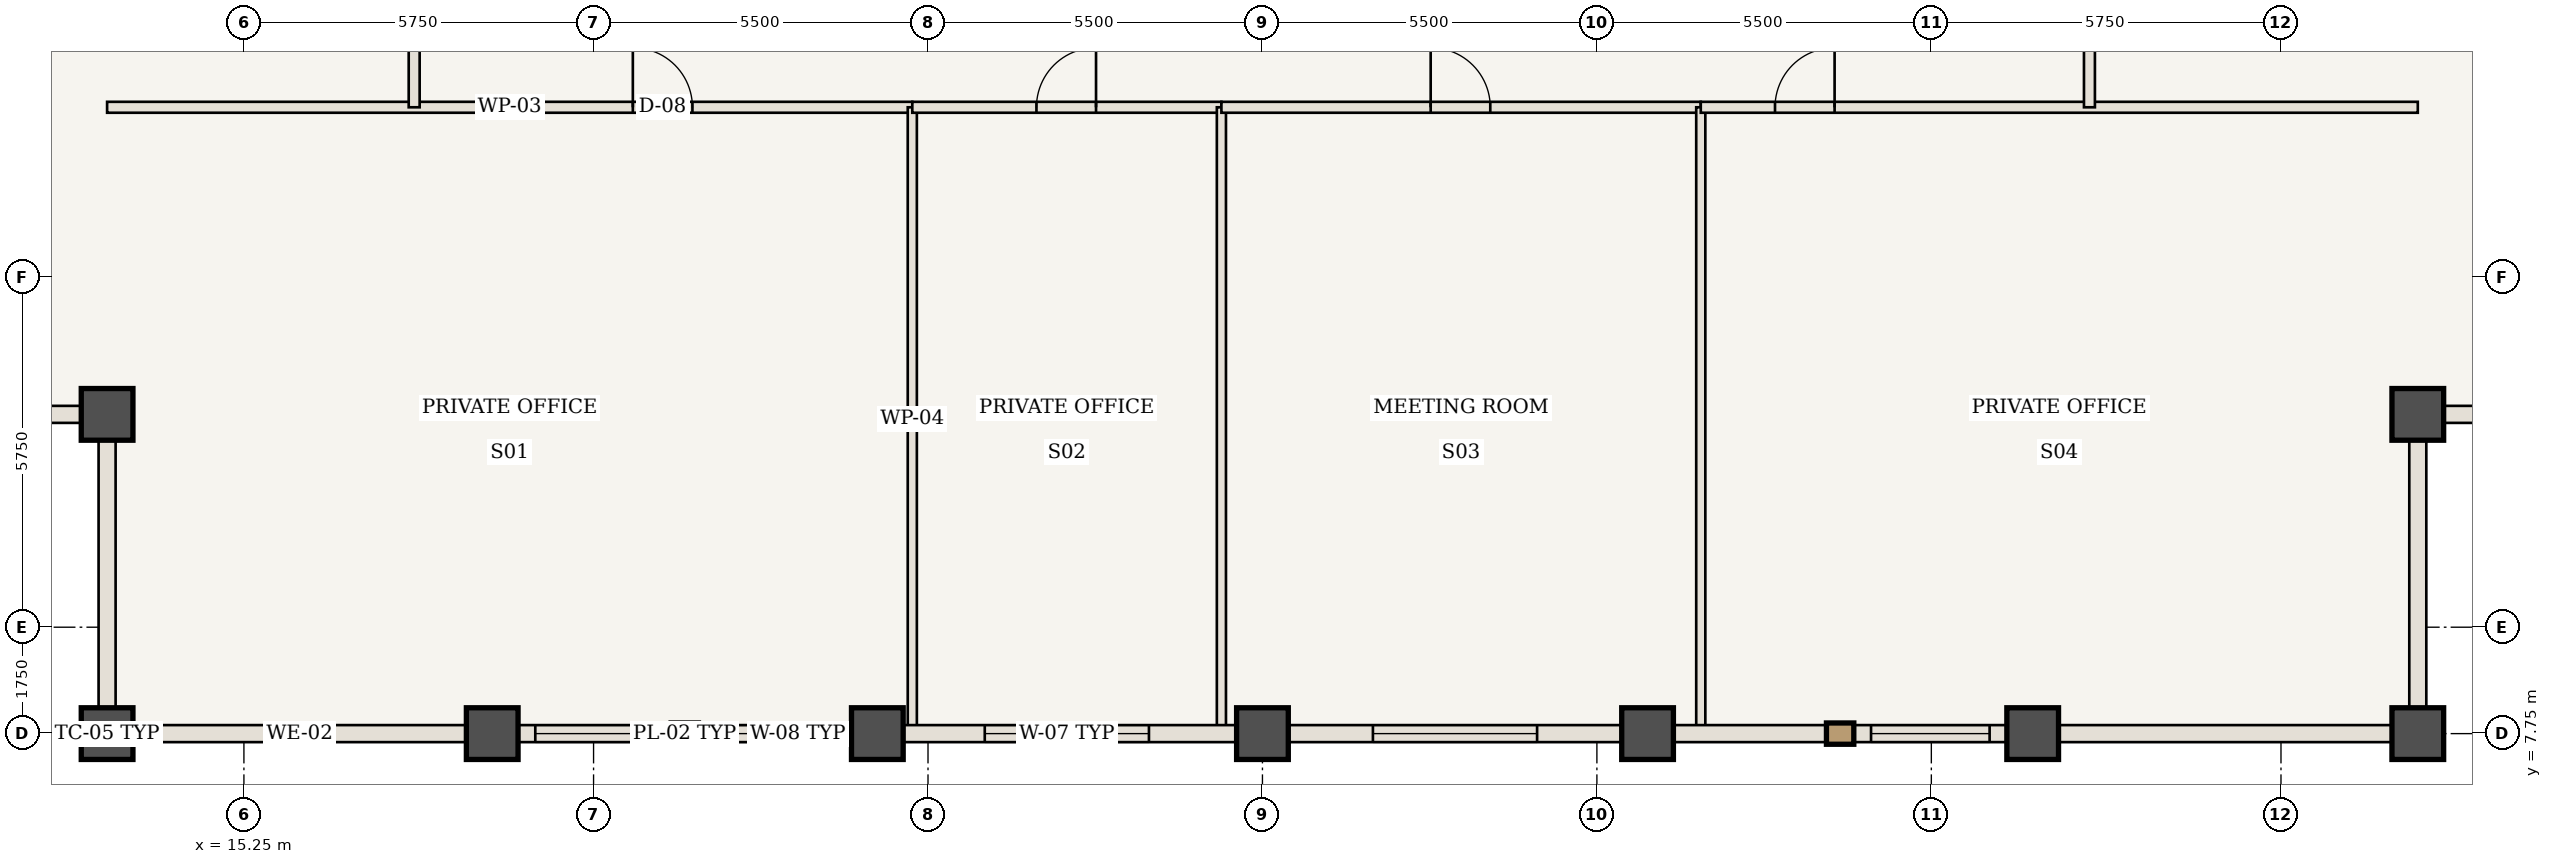
"""IFC4 building model, lengths in metres.
Left out: names, types, materials, properties, quantities, classifications, styles, units other than length and angle.
Written with IfcOpenShell. Run it as: python <this file> out.ifc"""

import sys

from ifc_helpers import new_model, si_unit, direction, frame, frame_2d, origin, origin_2d, place, context, subcontext, project, spatial, rectangle, extrude, element, fill, save


model = new_model("IFC4")
c1 = context("Model", 3, precision=1e-05, world=origin(), true_north=direction((0.0, 1.0)))
c2 = subcontext(c1, "Body", "Model", "MODEL_VIEW")
j1 = project(units=[si_unit("LENGTHUNIT", "METRE"), si_unit("PLANEANGLEUNIT", "RADIAN")], contexts=[c1])
p1 = place(None, origin())
s1 = spatial("IfcSite", under=j1, at=p1, CompositionType="ELEMENT")
p2 = place(p1, origin())
s2 = spatial("IfcBuilding", under=s1, at=p2, CompositionType="ELEMENT")
p3 = place(p2, frame((0.0, 0.0, 202.3)))
s3 = spatial("IfcBuildingStorey", under=s2, at=p3, CompositionType="ELEMENT", Elevation=202.3)
for number, where, z_axis, x_axis in (
    (1, (13.0, 7.75, 0.0), (0.0, 0.0, 1.0), (1.0, 0.0, 0.0)),
    (2, (13.0, 13.0, 0.0), (0.0, 0.0, 1.0), (1.0, 0.0, 0.0)),
    (3, (51.0, 7.75, 0.0), (0.0, 0.0, 1.0), (1.0, 0.0, 0.0)),
    (4, (51.0, 13.0, 0.0), (0.0, 0.0, 1.0), (1.0, 0.0, 0.0)),
    (5, (19.333, 7.75, 0.0), (0.0, 0.0, 1.0), (1.0, 0.0, 0.0)),
    (6, (25.667, 7.75, 0.0), (0.0, 0.0, 1.0), (1.0, 0.0, 0.0)),
    (7, (32.0, 7.75, 0.0), (0.0, 0.0, 1.0), (1.0, 0.0, 0.0)),
    (8, (38.333, 7.75, 0.0), (0.0, 0.0, 1.0), (1.0, 0.0, 0.0)),
    (9, (44.667, 7.75, 0.0), (0.0, 0.0, 1.0), (1.0, 0.0, 0.0)),
):
    element("IfcColumn", number, at=place(p3, frame(where, z_axis=z_axis, x_axis=x_axis)), inside=s3, PredefinedType="COLUMN", context=c2, shape_type="SweptSolid", body=[
        extrude(rectangle(XDim=0.85, YDim=0.85, at=origin_2d()), origin(), (0.0, 0.0, 1.0), 3.85),
    ])
p4 = place(p3, frame((13.0, 18.05, 0.0), z_axis=(0.0, 0.0, 1.0), x_axis=(1.0, 0.0, 0.0)))
e10 = element("IfcWall", 10, at=p4, inside=s3, PredefinedType="STANDARD", context=c2, shape_type="SweptSolid", body=[
    extrude(rectangle(XDim=13.242, YDim=0.18, at=frame_2d((6.621, 0.0))), origin(), (0.0, 0.0, 1.0), 3.685),
])
p5 = place(p4, frame((8.646, 0.0, 0.0)))
e11 = element("IfcOpeningElement", 11, at=p5, cuts=e10, PredefinedType="OPENING", context=c2, shape_type="SweptSolid", body=[
    extrude(rectangle(XDim=0.98, YDim=2.2, at=frame_2d((0.49, 1.1))), frame((0.0, 0.1, 0.0), z_axis=(0.0, -1.0, 0.0), x_axis=(1.0, 0.0, 0.0)), (0.0, 0.0, 1.0), 0.2),
])
p6 = place(p3, frame((26.242, 7.81, 0.0), z_axis=(0.0, 0.0, 1.0), x_axis=(0.0, 1.0, 0.0)))
e12 = element("IfcWall", 12, at=p6, inside=s3, PredefinedType="STANDARD", context=c2, shape_type="SweptSolid", body=[
    extrude(rectangle(XDim=10.24, YDim=0.15, at=frame_2d((5.12, 0.0))), origin(), (0.0, 0.0, 1.0), 3.685),
])
p7 = place(p3, frame((26.242, 18.05, 0.0), z_axis=(0.0, 0.0, 1.0), x_axis=(1.0, 0.0, 0.0)))
e13 = element("IfcWall", 13, at=p7, inside=s3, PredefinedType="STANDARD", context=c2, shape_type="SweptSolid", body=[
    extrude(rectangle(XDim=5.083, YDim=0.18, at=frame_2d((2.542, 0.0))), origin(), (0.0, 0.0, 1.0), 3.685),
])
p8 = place(p7, frame((2.042, 0.0, 0.0)))
e14 = element("IfcOpeningElement", 14, at=p8, cuts=e13, PredefinedType="OPENING", context=c2, shape_type="SweptSolid", body=[
    extrude(rectangle(XDim=0.98, YDim=2.2, at=frame_2d((0.49, 1.1))), frame((0.0, 0.1, 0.0), z_axis=(0.0, -1.0, 0.0), x_axis=(1.0, 0.0, 0.0)), (0.0, 0.0, 1.0), 0.2),
])
p9 = place(p3, frame((31.325, 7.81, 0.0), z_axis=(0.0, 0.0, 1.0), x_axis=(0.0, 1.0, 0.0)))
e15 = element("IfcWall", 15, at=p9, inside=s3, PredefinedType="STANDARD", context=c2, shape_type="SweptSolid", body=[
    extrude(rectangle(XDim=10.24, YDim=0.15, at=frame_2d((5.12, 0.0))), origin(), (0.0, 0.0, 1.0), 3.685),
])
p10 = place(p3, frame((31.325, 18.05, 0.0), z_axis=(0.0, 0.0, 1.0), x_axis=(1.0, 0.0, 0.0)))
e16 = element("IfcWall", 16, at=p10, inside=s3, PredefinedType="STANDARD", context=c2, shape_type="SweptSolid", body=[
    extrude(rectangle(XDim=7.883, YDim=0.18, at=frame_2d((3.942, 0.0))), origin(), (0.0, 0.0, 1.0), 3.685),
])
p11 = place(p10, frame((3.442, 0.0, 0.0)))
e17 = element("IfcOpeningElement", 17, at=p11, cuts=e16, PredefinedType="OPENING", context=c2, shape_type="SweptSolid", body=[
    extrude(rectangle(XDim=0.98, YDim=2.2, at=frame_2d((0.49, 1.1))), frame((0.0, 0.1, 0.0), z_axis=(0.0, -1.0, 0.0), x_axis=(1.0, 0.0, 0.0)), (0.0, 0.0, 1.0), 0.2),
])
p12 = place(p3, frame((39.208, 7.81, 0.0), z_axis=(0.0, 0.0, 1.0), x_axis=(0.0, 1.0, 0.0)))
e18 = element("IfcWall", 18, at=p12, inside=s3, PredefinedType="STANDARD", context=c2, shape_type="SweptSolid", body=[
    extrude(rectangle(XDim=10.24, YDim=0.15, at=frame_2d((5.12, 0.0))), origin(), (0.0, 0.0, 1.0), 3.685),
])
p13 = place(p3, frame((39.208, 18.05, 0.0), z_axis=(0.0, 0.0, 1.0), x_axis=(1.0, 0.0, 0.0)))
e19 = element("IfcWall", 19, at=p13, inside=s3, PredefinedType="STANDARD", context=c2, shape_type="SweptSolid", body=[
    extrude(rectangle(XDim=11.792, YDim=0.18, at=frame_2d((5.896, 0.0))), origin(), (0.0, 0.0, 1.0), 3.685),
])
p14 = place(p13, frame((1.221, 0.0, 0.0)))
e20 = element("IfcOpeningElement", 20, at=p14, cuts=e19, PredefinedType="OPENING", context=c2, shape_type="SweptSolid", body=[
    extrude(rectangle(XDim=0.98, YDim=2.2, at=frame_2d((0.49, 1.1))), frame((0.0, 0.1, 0.0), z_axis=(0.0, -1.0, 0.0), x_axis=(1.0, 0.0, 0.0)), (0.0, 0.0, 1.0), 0.2),
])
p15 = place(p3, frame((18.05, 18.05, 0.0), z_axis=(0.0, 0.0, 1.0), x_axis=(0.0, 1.0, 0.0)))
e21 = element("IfcWall", 21, at=p15, inside=s3, PredefinedType="STANDARD", context=c2, shape_type="SweptSolid", body=[
    extrude(rectangle(XDim=12.825, YDim=0.18, at=frame_2d((6.413, 0.0))), origin(), (0.0, 0.0, 1.0), 3.685),
])
p16 = place(p15, frame((5.913, 0.0, 0.0)))
e22 = element("IfcOpeningElement", 22, at=p16, cuts=e21, PredefinedType="OPENING", context=c2, shape_type="SweptSolid", body=[
    extrude(rectangle(XDim=0.98, YDim=2.2, at=frame_2d((0.49, 1.1))), frame((0.0, 0.1, 0.0), z_axis=(0.0, -1.0, 0.0), x_axis=(1.0, 0.0, 0.0)), (0.0, 0.0, 1.0), 0.2),
])
p17 = place(p3, frame((45.6, 18.05, 0.0), z_axis=(0.0, 0.0, 1.0), x_axis=(0.0, 1.0, 0.0)))
e23 = element("IfcWall", 23, at=p17, inside=s3, PredefinedType="STANDARD", context=c2, shape_type="SweptSolid", body=[
    extrude(rectangle(XDim=12.7, YDim=0.18, at=frame_2d((6.35, 0.0))), origin(), (0.0, 0.0, 1.0), 3.685),
])
p18 = place(p17, frame((5.85, 0.0, 0.0)))
e24 = element("IfcOpeningElement", 24, at=p18, cuts=e23, PredefinedType="OPENING", context=c2, shape_type="SweptSolid", body=[
    extrude(rectangle(XDim=0.98, YDim=2.2, at=frame_2d((0.49, 1.1))), frame((0.0, 0.1, 0.0), z_axis=(0.0, -1.0, 0.0), x_axis=(1.0, 0.0, 0.0)), (0.0, 0.0, 1.0), 0.2),
])
p19 = place(p3, frame((19.333, 7.75, 0.0), z_axis=(0.0, 0.0, 1.0), x_axis=(-1.0, 0.0, 0.0)))
e25 = element("IfcWall", 25, at=p19, inside=s3, PredefinedType="USERDEFINED", context=c2, shape_type="SweptSolid", body=[
    extrude(rectangle(XDim=6.333, YDim=0.28, at=frame_2d((3.167, 0.0))), origin(), (0.0, 0.0, 1.0), 2.985),
])
p20 = place(p3, frame((25.667, 7.75, 0.0), z_axis=(0.0, 0.0, 1.0), x_axis=(-1.0, 0.0, 0.0)))
e26 = element("IfcWall", 26, at=p20, inside=s3, PredefinedType="USERDEFINED", context=c2, shape_type="SweptSolid", body=[
    extrude(rectangle(XDim=6.333, YDim=0.28, at=frame_2d((3.167, 0.0))), origin(), (0.0, 0.0, 1.0), 2.985),
])
p21 = place(p20, frame((0.708, 0.0, 0.85)))
e27 = element("IfcOpeningElement", 27, at=p21, cuts=e26, PredefinedType="OPENING", context=c2, shape_type="SweptSolid", body=[
    extrude(rectangle(XDim=1.95, YDim=1.935, at=frame_2d((0.975, 0.968))), frame((0.0, 0.15, 0.0), z_axis=(0.0, -1.0, 0.0), x_axis=(1.0, 0.0, 0.0)), (0.0, 0.0, 1.0), 0.3),
])
p22 = place(p20, frame((3.675, 0.0, 0.85)))
e28 = element("IfcOpeningElement", 28, at=p22, cuts=e26, PredefinedType="OPENING", context=c2, shape_type="SweptSolid", body=[
    extrude(rectangle(XDim=1.95, YDim=1.935, at=frame_2d((0.975, 0.968))), frame((0.0, 0.15, 0.0), z_axis=(0.0, -1.0, 0.0), x_axis=(1.0, 0.0, 0.0)), (0.0, 0.0, 1.0), 0.3),
])
p23 = place(p3, frame((32.0, 7.75, 0.0), z_axis=(0.0, 0.0, 1.0), x_axis=(-1.0, 0.0, 0.0)))
e29 = element("IfcWall", 29, at=p23, inside=s3, PredefinedType="USERDEFINED", context=c2, shape_type="SweptSolid", body=[
    extrude(rectangle(XDim=6.333, YDim=0.28, at=frame_2d((3.167, 0.0))), origin(), (0.0, 0.0, 1.0), 2.985),
])
p24 = place(p23, frame((1.867, 0.0, 0.85)))
e30 = element("IfcOpeningElement", 30, at=p24, cuts=e29, PredefinedType="OPENING", context=c2, shape_type="SweptSolid", body=[
    extrude(rectangle(XDim=2.7, YDim=1.935, at=frame_2d((1.35, 0.968))), frame((0.0, 0.15, 0.0), z_axis=(0.0, -1.0, 0.0), x_axis=(1.0, 0.0, 0.0)), (0.0, 0.0, 1.0), 0.3),
])
p25 = place(p3, frame((38.333, 7.75, 0.0), z_axis=(0.0, 0.0, 1.0), x_axis=(-1.0, 0.0, 0.0)))
e31 = element("IfcWall", 31, at=p25, inside=s3, PredefinedType="USERDEFINED", context=c2, shape_type="SweptSolid", body=[
    extrude(rectangle(XDim=6.333, YDim=0.28, at=frame_2d((3.167, 0.0))), origin(), (0.0, 0.0, 1.0), 2.985),
])
p26 = place(p25, frame((1.817, 0.0, 0.85)))
e32 = element("IfcOpeningElement", 32, at=p26, cuts=e31, PredefinedType="OPENING", context=c2, shape_type="SweptSolid", body=[
    extrude(rectangle(XDim=2.7, YDim=1.935, at=frame_2d((1.35, 0.968))), frame((0.0, 0.15, 0.0), z_axis=(0.0, -1.0, 0.0), x_axis=(1.0, 0.0, 0.0)), (0.0, 0.0, 1.0), 0.3),
])
p27 = place(p3, frame((44.667, 7.75, 0.0), z_axis=(0.0, 0.0, 1.0), x_axis=(-1.0, 0.0, 0.0)))
e33 = element("IfcWall", 33, at=p27, inside=s3, PredefinedType="USERDEFINED", context=c2, shape_type="SweptSolid", body=[
    extrude(rectangle(XDim=6.333, YDim=0.28, at=frame_2d((3.167, 0.0))), origin(), (0.0, 0.0, 1.0), 2.985),
])
p28 = place(p27, frame((0.708, 0.0, 0.85)))
e34 = element("IfcOpeningElement", 34, at=p28, cuts=e33, PredefinedType="OPENING", context=c2, shape_type="SweptSolid", body=[
    extrude(rectangle(XDim=1.95, YDim=1.935, at=frame_2d((0.975, 0.968))), frame((0.0, 0.15, 0.0), z_axis=(0.0, -1.0, 0.0), x_axis=(1.0, 0.0, 0.0)), (0.0, 0.0, 1.0), 0.3),
])
p29 = place(p3, frame((51.0, 7.75, 0.0), z_axis=(0.0, 0.0, 1.0), x_axis=(-1.0, 0.0, 0.0)))
e35 = element("IfcWall", 35, at=p29, inside=s3, PredefinedType="USERDEFINED", context=c2, shape_type="SweptSolid", body=[
    extrude(rectangle(XDim=6.333, YDim=0.28, at=frame_2d((3.167, 0.0))), origin(), (0.0, 0.0, 1.0), 2.985),
])
for number, where, z_axis, x_axis in (
    (36, (13.0, 7.75, 0.0), (0.0, 0.0, 1.0), (0.0, 1.0, 0.0)),
    (37, (13.0, 13.0, 0.0), (0.0, 0.0, 1.0), (-1.0, 0.0, 0.0)),
    (38, (51.0, 13.0, 0.0), (0.0, 0.0, 1.0), (0.0, -1.0, 0.0)),
    (39, (56.25, 13.0, 0.0), (0.0, 0.0, 1.0), (-1.0, 0.0, 0.0)),
):
    element("IfcWall", number, at=place(p3, frame(where, z_axis=z_axis, x_axis=x_axis)), inside=s3, PredefinedType="USERDEFINED", context=c2, shape_type="SweptSolid", body=[
        extrude(rectangle(XDim=5.25, YDim=0.28, at=frame_2d((2.625, 0.0))), origin(), (0.0, 0.0, 1.0), 2.985),
    ])
p30 = place(p5, origin())
e40 = element("IfcDoor", 40, at=p30, inside=s3, OperationType="SINGLE_SWING_LEFT", PredefinedType="DOOR", context=c2, shape_type="SweptSolid", body=[
    extrude(rectangle(XDim=0.98, YDim=2.2, at=frame_2d((0.49, 1.1))), frame((0.0, 0.025, 0.0), z_axis=(0.0, -1.0, 0.0), x_axis=(1.0, 0.0, 0.0)), (0.0, 0.0, 1.0), 0.05),
])
fill(e11, e40)
p31 = place(p8, origin())
e41 = element("IfcDoor", 41, at=p31, inside=s3, OperationType="SINGLE_SWING_RIGHT", PredefinedType="DOOR", context=c2, shape_type="SweptSolid", body=[
    extrude(rectangle(XDim=0.98, YDim=2.2, at=frame_2d((0.49, 1.1))), frame((0.0, 0.025, 0.0), z_axis=(0.0, -1.0, 0.0), x_axis=(1.0, 0.0, 0.0)), (0.0, 0.0, 1.0), 0.05),
])
fill(e14, e41)
p32 = place(p11, origin())
e42 = element("IfcDoor", 42, at=p32, inside=s3, OperationType="SINGLE_SWING_LEFT", PredefinedType="DOOR", context=c2, shape_type="SweptSolid", body=[
    extrude(rectangle(XDim=0.98, YDim=2.2, at=frame_2d((0.49, 1.1))), frame((0.0, 0.025, 0.0), z_axis=(0.0, -1.0, 0.0), x_axis=(1.0, 0.0, 0.0)), (0.0, 0.0, 1.0), 0.05),
])
fill(e17, e42)
p33 = place(p14, origin())
e43 = element("IfcDoor", 43, at=p33, inside=s3, OperationType="SINGLE_SWING_RIGHT", PredefinedType="DOOR", context=c2, shape_type="SweptSolid", body=[
    extrude(rectangle(XDim=0.98, YDim=2.2, at=frame_2d((0.49, 1.1))), frame((0.0, 0.025, 0.0), z_axis=(0.0, -1.0, 0.0), x_axis=(1.0, 0.0, 0.0)), (0.0, 0.0, 1.0), 0.05),
])
fill(e20, e43)
p34 = place(p21, origin())
e44 = element("IfcWindow", 44, at=p34, inside=s3, PartitioningType="SINGLE_PANEL", PredefinedType="WINDOW", context=c2, shape_type="SweptSolid", body=[
    extrude(rectangle(XDim=1.95, YDim=1.935, at=frame_2d((0.975, 0.968))), frame((0.0, 0.03, 0.0), z_axis=(0.0, -1.0, 0.0), x_axis=(1.0, 0.0, 0.0)), (0.0, 0.0, 1.0), 0.06),
])
fill(e27, e44)
p35 = place(p22, origin())
e45 = element("IfcWindow", 45, at=p35, inside=s3, PartitioningType="SINGLE_PANEL", PredefinedType="WINDOW", context=c2, shape_type="SweptSolid", body=[
    extrude(rectangle(XDim=1.95, YDim=1.935, at=frame_2d((0.975, 0.968))), frame((0.0, 0.03, 0.0), z_axis=(0.0, -1.0, 0.0), x_axis=(1.0, 0.0, 0.0)), (0.0, 0.0, 1.0), 0.06),
])
fill(e28, e45)
p36 = place(p24, origin())
e46 = element("IfcWindow", 46, at=p36, inside=s3, PartitioningType="SINGLE_PANEL", PredefinedType="WINDOW", context=c2, shape_type="SweptSolid", body=[
    extrude(rectangle(XDim=2.7, YDim=1.935, at=frame_2d((1.35, 0.968))), frame((0.0, 0.03, 0.0), z_axis=(0.0, -1.0, 0.0), x_axis=(1.0, 0.0, 0.0)), (0.0, 0.0, 1.0), 0.06),
])
fill(e30, e46)
p37 = place(p26, origin())
e47 = element("IfcWindow", 47, at=p37, inside=s3, PartitioningType="SINGLE_PANEL", PredefinedType="WINDOW", context=c2, shape_type="SweptSolid", body=[
    extrude(rectangle(XDim=2.7, YDim=1.935, at=frame_2d((1.35, 0.968))), frame((0.0, 0.03, 0.0), z_axis=(0.0, -1.0, 0.0), x_axis=(1.0, 0.0, 0.0)), (0.0, 0.0, 1.0), 0.06),
])
fill(e32, e47)
p38 = place(p28, origin())
e48 = element("IfcWindow", 48, at=p38, inside=s3, PartitioningType="SINGLE_PANEL", PredefinedType="WINDOW", context=c2, shape_type="SweptSolid", body=[
    extrude(rectangle(XDim=1.95, YDim=1.935, at=frame_2d((0.975, 0.968))), frame((0.0, 0.03, 0.0), z_axis=(0.0, -1.0, 0.0), x_axis=(1.0, 0.0, 0.0)), (0.0, 0.0, 1.0), 0.06),
])
fill(e34, e48)
save(model, sys.argv[1])
